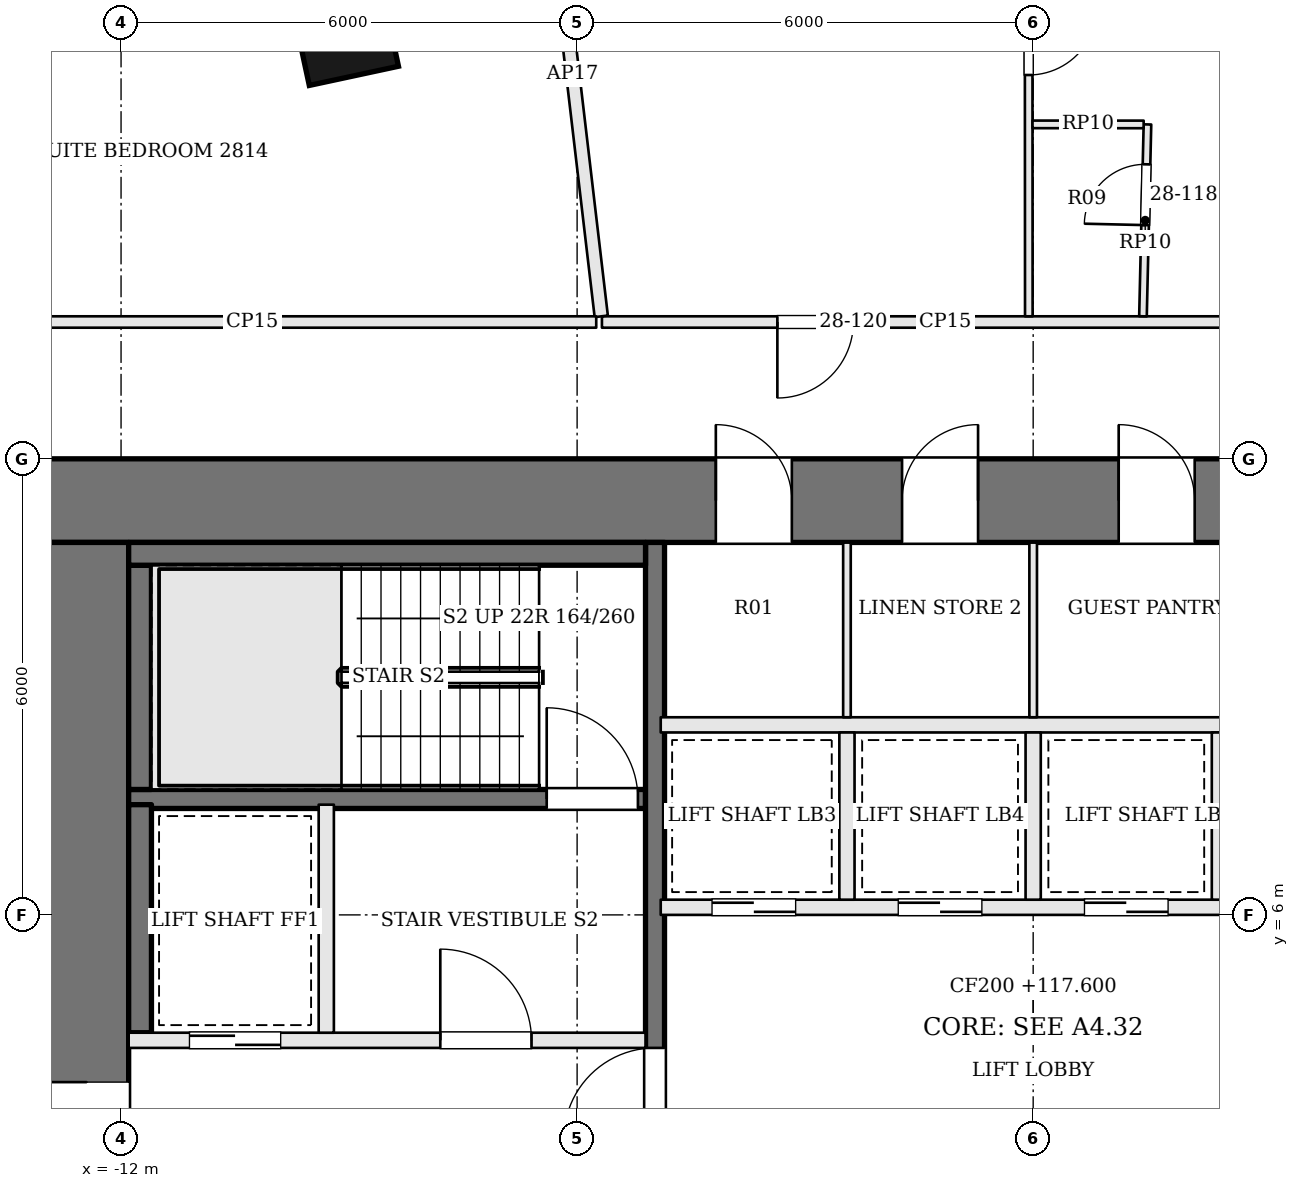
"""IFC4 building model, lengths in metres.
Left out: names, types, materials, properties, quantities, classifications, styles, units other than length and angle.
Written with IfcOpenShell. Run it as: python <this file> out.ifc"""

import sys

from ifc_helpers import new_model, si_unit, direction, frame, frame_2d, origin, origin_2d, place, context, subcontext, project, spatial, rectangle, extrude, element, fill, save


model = new_model("IFC4")
c1 = context("Model", 3, precision=1e-05, world=origin(), true_north=direction((0.0, 1.0)))
c2 = subcontext(c1, "Body", "Model", "MODEL_VIEW")
j1 = project(units=[si_unit("LENGTHUNIT", "METRE"), si_unit("PLANEANGLEUNIT", "RADIAN")], contexts=[c1])
p1 = place(None, origin())
s1 = spatial("IfcSite", under=j1, at=p1, CompositionType="ELEMENT")
p2 = place(p1, origin())
s2 = spatial("IfcBuilding", under=s1, at=p2, CompositionType="ELEMENT")
p3 = place(p2, frame((0.0, 0.0, 117.6)))
s3 = spatial("IfcBuildingStorey", under=s2, at=p3, CompositionType="ELEMENT", Elevation=117.6)
p4 = place(p3, frame((-13.0, 11.45, 0.0), z_axis=(0.0, 0.0, 1.0), x_axis=(1.0, 0.0, 0.0)))
e1 = element("IfcWall", 1, at=p4, inside=s3, PredefinedType="SHEAR", context=c2, shape_type="SweptSolid", body=[
    extrude(rectangle(XDim=26.0, YDim=1.1, at=frame_2d((13.0, 0.0))), origin(), (0.0, 0.0, 1.0), 3.6),
])
p5 = place(p4, frame((8.825, 0.0, 0.0)))
e2 = element("IfcOpeningElement", 2, at=p5, cuts=e1, PredefinedType="OPENING", context=c2, shape_type="SweptSolid", body=[
    extrude(rectangle(XDim=1.0, YDim=2.1, at=frame_2d((0.5, 1.05))), frame((0.0, 0.56, 0.0), z_axis=(0.0, -1.0, 0.0), x_axis=(1.0, 0.0, 0.0)), (0.0, 0.0, 1.0), 1.12),
])
p6 = place(p4, frame((11.275, 0.0, 0.0)))
e3 = element("IfcOpeningElement", 3, at=p6, cuts=e1, PredefinedType="OPENING", context=c2, shape_type="SweptSolid", body=[
    extrude(rectangle(XDim=1.0, YDim=2.1, at=frame_2d((0.5, 1.05))), frame((0.0, 0.56, 0.0), z_axis=(0.0, -1.0, 0.0), x_axis=(1.0, 0.0, 0.0)), (0.0, 0.0, 1.0), 1.12),
])
p7 = place(p4, frame((14.125, 0.0, 0.0)))
e4 = element("IfcOpeningElement", 4, at=p7, cuts=e1, PredefinedType="OPENING", context=c2, shape_type="SweptSolid", body=[
    extrude(rectangle(XDim=1.0, YDim=2.1, at=frame_2d((0.5, 1.05))), frame((0.0, 0.56, 0.0), z_axis=(0.0, -1.0, 0.0), x_axis=(1.0, 0.0, 0.0)), (0.0, 0.0, 1.0), 1.12),
])
p8 = place(p4, frame((16.725, 0.0, 0.0)))
e5 = element("IfcOpeningElement", 5, at=p8, cuts=e1, PredefinedType="OPENING", context=c2, shape_type="SweptSolid", body=[
    extrude(rectangle(XDim=0.7, YDim=2.1, at=frame_2d((0.35, 1.05))), frame((0.0, 0.56, 0.0), z_axis=(0.0, -1.0, 0.0), x_axis=(1.0, 0.0, 0.0)), (0.0, 0.0, 1.0), 1.12),
])
p9 = place(p3, frame((-12.45, -1.9, 0.0), z_axis=(0.0, 0.0, 1.0), x_axis=(0.0, 1.0, 0.0)))
e6 = element("IfcWall", 6, at=p9, inside=s3, PredefinedType="SHEAR", context=c2, shape_type="SweptSolid", body=[
    extrude(rectangle(XDim=12.8, YDim=1.1, at=frame_2d((6.4, 0.0))), origin(), (0.0, 0.0, 1.0), 3.6),
])
p10 = place(p9, frame((3.9, 0.0, 0.0)))
e7 = element("IfcOpeningElement", 7, at=p10, cuts=e6, PredefinedType="OPENING", context=c2, shape_type="SweptSolid", body=[
    extrude(rectangle(XDim=1.8, YDim=2.1, at=frame_2d((0.9, 1.05))), frame((0.0, 0.56, 0.0), z_axis=(0.0, -1.0, 0.0), x_axis=(1.0, 0.0, 0.0)), (0.0, 0.0, 1.0), 1.12),
])
p11 = place(p3, frame((-9.063, 17.625, 0.0), z_axis=(0.0, 0.0, 1.0), x_axis=(-0.977652674797, -0.210226657352, 0.0)))
e8 = element("IfcColumn", 8, at=p11, inside=s3, PredefinedType="COLUMN", context=c2, shape_type="SweptSolid", body=[
    extrude(rectangle(XDim=1.2, YDim=1.2, at=origin_2d()), origin(), (0.0, 0.0, 1.0), 2.8),
])
p12 = place(p3, frame((-11.9, 4.35, 0.0), z_axis=(0.0, 0.0, 1.0), x_axis=(1.0, 0.0, 0.0)))
e9 = element("IfcWall", 9, at=p12, inside=s3, PredefinedType="SOLIDWALL", context=c2, shape_type="SweptSolid", body=[
    extrude(rectangle(XDim=6.8, YDim=0.2, at=frame_2d((3.4, 0.0))), origin(), (0.0, 0.0, 1.0), 3.3),
])
p13 = place(p12, frame((4.1, 0.0, 0.0)))
e10 = element("IfcOpeningElement", 10, at=p13, cuts=e9, PredefinedType="OPENING", context=c2, shape_type="SweptSolid", body=[
    extrude(rectangle(XDim=1.2, YDim=2.1, at=frame_2d((0.6, 1.05))), frame((0.0, 0.11, 0.0), z_axis=(0.0, -1.0, 0.0), x_axis=(1.0, 0.0, 0.0)), (0.0, 0.0, 1.0), 0.22),
])
p14 = place(p12, frame((0.8, 0.0, 0.0)))
e11 = element("IfcOpeningElement", 11, at=p14, cuts=e9, PredefinedType="OPENING", context=c2, shape_type="SweptSolid", body=[
    extrude(rectangle(XDim=1.2, YDim=2.1, at=frame_2d((0.6, 1.05))), frame((0.0, 0.11, 0.0), z_axis=(0.0, -1.0, 0.0), x_axis=(1.0, 0.0, 0.0)), (0.0, 0.0, 1.0), 0.22),
])
p15 = place(p3, frame((-11.9, 7.525, 0.0), z_axis=(0.0, 0.0, 1.0), x_axis=(1.0, 0.0, 0.0)))
e12 = element("IfcWall", 12, at=p15, inside=s3, PredefinedType="SOLIDWALL", context=c2, shape_type="SweptSolid", body=[
    extrude(rectangle(XDim=6.8, YDim=0.25, at=frame_2d((3.4, 0.0))), origin(), (0.0, 0.0, 1.0), 3.3),
])
p16 = place(p15, frame((5.5, 0.0, 0.0)))
e13 = element("IfcOpeningElement", 13, at=p16, cuts=e12, PredefinedType="OPENING", context=c2, shape_type="SweptSolid", body=[
    extrude(rectangle(XDim=1.2, YDim=2.1, at=frame_2d((0.6, 1.05))), frame((0.0, 0.135, 0.0), z_axis=(0.0, -1.0, 0.0), x_axis=(1.0, 0.0, 0.0)), (0.0, 0.0, 1.0), 0.27),
])
p17 = place(p3, frame((-9.3, 4.45, 0.0), z_axis=(0.0, 0.0, 1.0), x_axis=(0.0, 1.0, 0.0)))
e14 = element("IfcWall", 14, at=p17, inside=s3, PredefinedType="SOLIDWALL", context=c2, shape_type="SweptSolid", body=[
    extrude(rectangle(XDim=3.0, YDim=0.2, at=frame_2d((1.5, 0.0))), origin(), (0.0, 0.0, 1.0), 3.3),
])
p18 = place(p3, frame((-4.975, -1.9, 0.0), z_axis=(0.0, 0.0, 1.0), x_axis=(0.0, 1.0, 0.0)))
e15 = element("IfcWall", 15, at=p18, inside=s3, PredefinedType="SOLIDWALL", context=c2, shape_type="SweptSolid", body=[
    extrude(rectangle(XDim=12.8, YDim=0.25, at=frame_2d((6.4, 0.0))), origin(), (0.0, 0.0, 1.0), 3.3),
])
p19 = place(p18, frame((4.95, 0.0, 0.0)))
e16 = element("IfcOpeningElement", 16, at=p19, cuts=e15, PredefinedType="OPENING", context=c2, shape_type="SweptSolid", body=[
    extrude(rectangle(XDim=1.2, YDim=2.1, at=frame_2d((0.6, 1.05))), frame((0.0, 0.135, 0.0), z_axis=(0.0, -1.0, 0.0), x_axis=(1.0, 0.0, 0.0)), (0.0, 0.0, 1.0), 0.27),
])
p20 = place(p3, frame((-11.75, 4.45, 0.0), z_axis=(0.0, 0.0, 1.0), x_axis=(0.0, 1.0, 0.0)))
e17 = element("IfcWall", 17, at=p20, inside=s3, PredefinedType="SOLIDWALL", context=c2, shape_type="SweptSolid", body=[
    extrude(rectangle(XDim=3.0, YDim=0.3, at=frame_2d((1.5, 0.0))), origin(), (0.0, 0.0, 1.0), 3.3),
])
p21 = place(p3, frame((-11.75, 7.65, 0.0), z_axis=(0.0, 0.0, 1.0), x_axis=(0.0, 1.0, 0.0)))
e18 = element("IfcWall", 18, at=p21, inside=s3, PredefinedType="SOLIDWALL", context=c2, shape_type="SweptSolid", body=[
    extrude(rectangle(XDim=2.95, YDim=0.3, at=frame_2d((1.475, 0.0))), origin(), (0.0, 0.0, 1.0), 3.3),
])
p22 = place(p3, frame((-11.9, 10.75, 0.0), z_axis=(0.0, 0.0, 1.0), x_axis=(1.0, 0.0, 0.0)))
e19 = element("IfcWall", 19, at=p22, inside=s3, PredefinedType="SOLIDWALL", context=c2, shape_type="SweptSolid", body=[
    extrude(rectangle(XDim=6.8, YDim=0.3, at=frame_2d((3.4, 0.0))), origin(), (0.0, 0.0, 1.0), 3.3),
])
p23 = place(p3, frame((-4.9, 6.1, 0.0), z_axis=(0.0, 0.0, 1.0), x_axis=(1.0, 0.0, 0.0)))
e20 = element("IfcWall", 20, at=p23, inside=s3, PredefinedType="SOLIDWALL", context=c2, shape_type="SweptSolid", body=[
    extrude(rectangle(XDim=9.8, YDim=0.2, at=frame_2d((4.9, 0.0))), origin(), (0.0, 0.0, 1.0), 3.3),
])
p24 = place(p23, frame((0.675, 0.0, 0.0)))
e21 = element("IfcOpeningElement", 21, at=p24, cuts=e20, PredefinedType="OPENING", context=c2, shape_type="SweptSolid", body=[
    extrude(rectangle(XDim=1.1, YDim=2.1, at=frame_2d((0.55, 1.05))), frame((0.0, 0.11, 0.0), z_axis=(0.0, -1.0, 0.0), x_axis=(1.0, 0.0, 0.0)), (0.0, 0.0, 1.0), 0.22),
])
p25 = place(p23, frame((3.125, 0.0, 0.0)))
e22 = element("IfcOpeningElement", 22, at=p25, cuts=e20, PredefinedType="OPENING", context=c2, shape_type="SweptSolid", body=[
    extrude(rectangle(XDim=1.1, YDim=2.1, at=frame_2d((0.55, 1.05))), frame((0.0, 0.11, 0.0), z_axis=(0.0, -1.0, 0.0), x_axis=(1.0, 0.0, 0.0)), (0.0, 0.0, 1.0), 0.22),
])
p26 = place(p23, frame((5.575, 0.0, 0.0)))
e23 = element("IfcOpeningElement", 23, at=p26, cuts=e20, PredefinedType="OPENING", context=c2, shape_type="SweptSolid", body=[
    extrude(rectangle(XDim=1.1, YDim=2.1, at=frame_2d((0.55, 1.05))), frame((0.0, 0.11, 0.0), z_axis=(0.0, -1.0, 0.0), x_axis=(1.0, 0.0, 0.0)), (0.0, 0.0, 1.0), 0.22),
])
p27 = place(p23, frame((8.025, 0.0, 0.0)))
e24 = element("IfcOpeningElement", 24, at=p27, cuts=e20, PredefinedType="OPENING", context=c2, shape_type="SweptSolid", body=[
    extrude(rectangle(XDim=1.1, YDim=2.1, at=frame_2d((0.55, 1.05))), frame((0.0, 0.11, 0.0), z_axis=(0.0, -1.0, 0.0), x_axis=(1.0, 0.0, 0.0)), (0.0, 0.0, 1.0), 0.22),
])
p28 = place(p3, frame((-4.9, 8.5, 0.0), z_axis=(0.0, 0.0, 1.0), x_axis=(1.0, 0.0, 0.0)))
e25 = element("IfcWall", 25, at=p28, inside=s3, PredefinedType="SOLIDWALL", context=c2, shape_type="SweptSolid", body=[
    extrude(rectangle(XDim=9.8, YDim=0.2, at=frame_2d((4.9, 0.0))), origin(), (0.0, 0.0, 1.0), 3.3),
])
for number, where, z_axis, x_axis in (
    (26, (-2.45, 6.2, 0.0), (0.0, 0.0, 1.0), (0.0, 1.0, 0.0)),
    (27, (0.0, 6.2, 0.0), (0.0, 0.0, 1.0), (0.0, 1.0, 0.0)),
    (28, (2.45, 6.2, 0.0), (0.0, 0.0, 1.0), (0.0, 1.0, 0.0)),
):
    element("IfcWall", number, at=place(p3, frame(where, z_axis=z_axis, x_axis=x_axis)), inside=s3, PredefinedType="SOLIDWALL", context=c2, shape_type="SweptSolid", body=[
        extrude(rectangle(XDim=2.2, YDim=0.2, at=frame_2d((1.1, 0.0))), origin(), (0.0, 0.0, 1.0), 3.3),
    ])
for number, where, z_axis, x_axis in (
    (29, (-2.45, 8.6, 0.0), (0.0, 0.0, 1.0), (0.0, 1.0, 0.0)),
    (30, (0.0, 8.6, 0.0), (0.0, 0.0, 1.0), (0.0, 1.0, 0.0)),
):
    element("IfcWall", number, at=place(p3, frame(where, z_axis=z_axis, x_axis=x_axis)), inside=s3, PredefinedType="PARTITIONING", context=c2, shape_type="SweptSolid", body=[
        extrude(rectangle(XDim=2.3, YDim=0.1, at=frame_2d((1.15, 0.0))), origin(), (0.0, 0.0, 1.0), 3.3),
    ])
p29 = place(p3, frame((2.76, 13.8, 0.0), z_axis=(0.0, 0.0, 1.0), x_axis=(-1.0, 0.0, 0.0)))
e31 = element("IfcWall", 31, at=p29, inside=s3, PredefinedType="PARTITIONING", context=c2, shape_type="SweptSolid", body=[
    extrude(rectangle(XDim=8.434, YDim=0.15, at=frame_2d((4.217, 0.0))), origin(), (0.0, 0.0, 1.0), 2.684),
])
p30 = place(p29, frame((5.126, 0.0, 0.0)))
e32 = element("IfcOpeningElement", 32, at=p30, cuts=e31, PredefinedType="OPENING", context=c2, shape_type="SweptSolid", body=[
    extrude(rectangle(XDim=1.0, YDim=2.1, at=frame_2d((0.5, 1.05))), frame((0.0, 0.085, 0.0), z_axis=(0.0, -1.0, 0.0), x_axis=(1.0, 0.0, 0.0)), (0.0, 0.0, 1.0), 0.17),
])
p31 = place(p3, frame((-6.433, 20.256, 0.0), z_axis=(0.0, 0.0, 1.0), x_axis=(0.116872110209, -0.993146972938, 0.0)))
e33 = element("IfcWall", 33, at=p31, inside=s3, PredefinedType="PARTITIONING", context=c2, shape_type="SweptSolid", body=[
    extrude(rectangle(XDim=6.426, YDim=0.175, at=frame_2d((3.213, 0.0))), origin(), (0.0, 0.0, 1.0), 2.684),
])
p32 = place(p3, frame((-5.749, 13.8, 0.0), z_axis=(0.0, 0.0, 1.0), x_axis=(-1.0, 0.0, 0.0)))
e34 = element("IfcWall", 34, at=p32, inside=s3, PredefinedType="PARTITIONING", context=c2, shape_type="SweptSolid", body=[
    extrude(rectangle(XDim=9.052, YDim=0.15, at=frame_2d((4.526, 0.0))), origin(), (0.0, 0.0, 1.0), 2.684),
])
p33 = place(p3, frame((-0.062, 22.837, 0.0), z_axis=(0.0, 0.0, 1.0), x_axis=(0.000599291639, -0.999999820425, 0.0)))
e35 = element("IfcWall", 35, at=p33, inside=s3, PredefinedType="PARTITIONING", context=c2, shape_type="SweptSolid", body=[
    extrude(rectangle(XDim=8.962, YDim=0.1, at=frame_2d((4.481, 0.0))), origin(), (0.0, 0.0, 1.0), 2.684),
])
p34 = place(p33, frame((4.888, 0.0, 0.0)))
e36 = element("IfcOpeningElement", 36, at=p34, cuts=e35, PredefinedType="OPENING", context=c2, shape_type="SweptSolid", body=[
    extrude(rectangle(XDim=0.9, YDim=2.4, at=frame_2d((0.45, 1.2))), frame((0.0, 0.06, 0.0), z_axis=(0.0, -1.0, 0.0), x_axis=(1.0, 0.0, 0.0)), (0.0, 0.0, 1.0), 0.12),
])
p35 = place(p3, frame((1.445, 13.875, 0.0), z_axis=(0.0, 0.0, 1.0), x_axis=(0.023301215285, 0.999728489824, 0.0)))
e37 = element("IfcWall", 37, at=p35, inside=s3, PredefinedType="PARTITIONING", context=c2, shape_type="SweptSolid", body=[
    extrude(rectangle(XDim=2.525, YDim=0.1, at=frame_2d((1.263, 0.0))), origin(), (0.0, 0.0, 1.0), 2.684),
])
p36 = place(p35, frame((1.2, 0.0, 0.0)))
e38 = element("IfcOpeningElement", 38, at=p36, cuts=e37, PredefinedType="OPENING", context=c2, shape_type="SweptSolid", body=[
    extrude(rectangle(XDim=0.8, YDim=2.1, at=frame_2d((0.4, 1.05))), frame((0.0, 0.06, 0.0), z_axis=(0.0, -1.0, 0.0), x_axis=(1.0, 0.0, 0.0)), (0.0, 0.0, 1.0), 0.12),
])
p37 = place(p3, frame((1.454, 16.399, 0.0), z_axis=(0.0, 0.0, 1.0), x_axis=(-0.999999944259, 0.000333889798, 0.0)))
e39 = element("IfcWall", 39, at=p37, inside=s3, PredefinedType="PARTITIONING", context=c2, shape_type="SweptSolid", body=[
    extrude(rectangle(XDim=1.462, YDim=0.1, at=frame_2d((0.731, 0.0))), origin(), (0.0, 0.0, 1.0), 2.684),
])
p38 = place(p10, origin())
e40 = element("IfcDoor", 40, at=p38, inside=s3, OperationType="DOUBLE_DOOR_SINGLE_SWING", PredefinedType="DOOR", context=c2, shape_type="SweptSolid", body=[
    extrude(rectangle(XDim=1.8, YDim=2.1, at=frame_2d((0.9, 1.05))), frame((0.0, 0.025, 0.0), z_axis=(0.0, -1.0, 0.0), x_axis=(1.0, 0.0, 0.0)), (0.0, 0.0, 1.0), 0.05),
])
fill(e7, e40)
p39 = place(p19, origin())
e41 = element("IfcDoor", 41, at=p39, inside=s3, OperationType="SINGLE_SWING_LEFT", PredefinedType="DOOR", context=c2, shape_type="SweptSolid", body=[
    extrude(rectangle(XDim=1.2, YDim=2.1, at=frame_2d((0.6, 1.05))), frame((0.0, 0.025, 0.0), z_axis=(0.0, -1.0, 0.0), x_axis=(1.0, 0.0, 0.0)), (0.0, 0.0, 1.0), 0.05),
])
fill(e16, e41)
p40 = place(p13, origin())
e42 = element("IfcDoor", 42, at=p40, inside=s3, OperationType="SINGLE_SWING_LEFT", PredefinedType="DOOR", context=c2, shape_type="SweptSolid", body=[
    extrude(rectangle(XDim=1.2, YDim=2.1, at=frame_2d((0.6, 1.05))), frame((0.0, 0.025, 0.0), z_axis=(0.0, -1.0, 0.0), x_axis=(1.0, 0.0, 0.0)), (0.0, 0.0, 1.0), 0.05),
])
fill(e10, e42)
p41 = place(p16, origin())
e43 = element("IfcDoor", 43, at=p41, inside=s3, OperationType="SINGLE_SWING_LEFT", PredefinedType="DOOR", context=c2, shape_type="SweptSolid", body=[
    extrude(rectangle(XDim=1.2, YDim=2.1, at=frame_2d((0.6, 1.05))), frame((0.0, 0.025, 0.0), z_axis=(0.0, -1.0, 0.0), x_axis=(1.0, 0.0, 0.0)), (0.0, 0.0, 1.0), 0.05),
])
fill(e13, e43)
p42 = place(p14, origin())
e44 = element("IfcDoor", 44, at=p42, inside=s3, OperationType="SLIDING_TO_RIGHT", PredefinedType="DOOR", context=c2, shape_type="SweptSolid", body=[
    extrude(rectangle(XDim=1.2, YDim=2.1, at=frame_2d((0.6, 1.05))), frame((0.0, 0.025, 0.0), z_axis=(0.0, -1.0, 0.0), x_axis=(1.0, 0.0, 0.0)), (0.0, 0.0, 1.0), 0.05),
])
fill(e11, e44)
p43 = place(p24, origin())
e45 = element("IfcDoor", 45, at=p43, inside=s3, OperationType="SLIDING_TO_RIGHT", PredefinedType="DOOR", context=c2, shape_type="SweptSolid", body=[
    extrude(rectangle(XDim=1.1, YDim=2.1, at=frame_2d((0.55, 1.05))), frame((0.0, 0.025, 0.0), z_axis=(0.0, -1.0, 0.0), x_axis=(1.0, 0.0, 0.0)), (0.0, 0.0, 1.0), 0.05),
])
fill(e21, e45)
p44 = place(p25, origin())
e46 = element("IfcDoor", 46, at=p44, inside=s3, OperationType="SLIDING_TO_LEFT", PredefinedType="DOOR", context=c2, shape_type="SweptSolid", body=[
    extrude(rectangle(XDim=1.1, YDim=2.1, at=frame_2d((0.55, 1.05))), frame((0.0, 0.025, 0.0), z_axis=(0.0, -1.0, 0.0), x_axis=(1.0, 0.0, 0.0)), (0.0, 0.0, 1.0), 0.05),
])
fill(e22, e46)
p45 = place(p26, origin())
e47 = element("IfcDoor", 47, at=p45, inside=s3, OperationType="SLIDING_TO_RIGHT", PredefinedType="DOOR", context=c2, shape_type="SweptSolid", body=[
    extrude(rectangle(XDim=1.1, YDim=2.1, at=frame_2d((0.55, 1.05))), frame((0.0, 0.025, 0.0), z_axis=(0.0, -1.0, 0.0), x_axis=(1.0, 0.0, 0.0)), (0.0, 0.0, 1.0), 0.05),
])
fill(e23, e47)
p46 = place(p5, origin())
e48 = element("IfcDoor", 48, at=p46, inside=s3, OperationType="SINGLE_SWING_LEFT", PredefinedType="DOOR", context=c2, shape_type="SweptSolid", body=[
    extrude(rectangle(XDim=1.0, YDim=2.1, at=frame_2d((0.5, 1.05))), frame((0.0, 0.025, 0.0), z_axis=(0.0, -1.0, 0.0), x_axis=(1.0, 0.0, 0.0)), (0.0, 0.0, 1.0), 0.05),
])
fill(e2, e48)
p47 = place(p6, origin())
e49 = element("IfcDoor", 49, at=p47, inside=s3, OperationType="SINGLE_SWING_RIGHT", PredefinedType="DOOR", context=c2, shape_type="SweptSolid", body=[
    extrude(rectangle(XDim=1.0, YDim=2.1, at=frame_2d((0.5, 1.05))), frame((0.0, 0.025, 0.0), z_axis=(0.0, -1.0, 0.0), x_axis=(1.0, 0.0, 0.0)), (0.0, 0.0, 1.0), 0.05),
])
fill(e3, e49)
p48 = place(p7, origin())
e50 = element("IfcDoor", 50, at=p48, inside=s3, OperationType="SINGLE_SWING_LEFT", PredefinedType="DOOR", context=c2, shape_type="SweptSolid", body=[
    extrude(rectangle(XDim=1.0, YDim=2.1, at=frame_2d((0.5, 1.05))), frame((0.0, 0.025, 0.0), z_axis=(0.0, -1.0, 0.0), x_axis=(1.0, 0.0, 0.0)), (0.0, 0.0, 1.0), 0.05),
])
fill(e4, e50)
p49 = place(p36, origin())
e51 = element("IfcDoor", 51, at=p49, inside=s3, OperationType="SINGLE_SWING_LEFT", PredefinedType="DOOR", context=c2, shape_type="SweptSolid", body=[
    extrude(rectangle(XDim=0.8, YDim=2.1, at=frame_2d((0.4, 1.05))), frame((0.0, 0.025, 0.0), z_axis=(0.0, -1.0, 0.0), x_axis=(1.0, 0.0, 0.0)), (0.0, 0.0, 1.0), 0.05),
])
fill(e38, e51)
p50 = place(p34, origin())
e52 = element("IfcDoor", 52, at=p50, inside=s3, OperationType="SINGLE_SWING_LEFT", PredefinedType="DOOR", context=c2, shape_type="SweptSolid", body=[
    extrude(rectangle(XDim=0.9, YDim=2.4, at=frame_2d((0.45, 1.2))), frame((0.0, 0.025, 0.0), z_axis=(0.0, -1.0, 0.0), x_axis=(1.0, 0.0, 0.0)), (0.0, 0.0, 1.0), 0.05),
])
fill(e36, e52)
p51 = place(p30, origin())
e53 = element("IfcDoor", 53, at=p51, inside=s3, OperationType="SINGLE_SWING_RIGHT", PredefinedType="DOOR", context=c2, shape_type="SweptSolid", body=[
    extrude(rectangle(XDim=1.0, YDim=2.1, at=frame_2d((0.5, 1.05))), frame((0.0, 0.025, 0.0), z_axis=(0.0, -1.0, 0.0), x_axis=(1.0, 0.0, 0.0)), (0.0, 0.0, 1.0), 0.05),
])
fill(e32, e53)
save(model, sys.argv[1])
